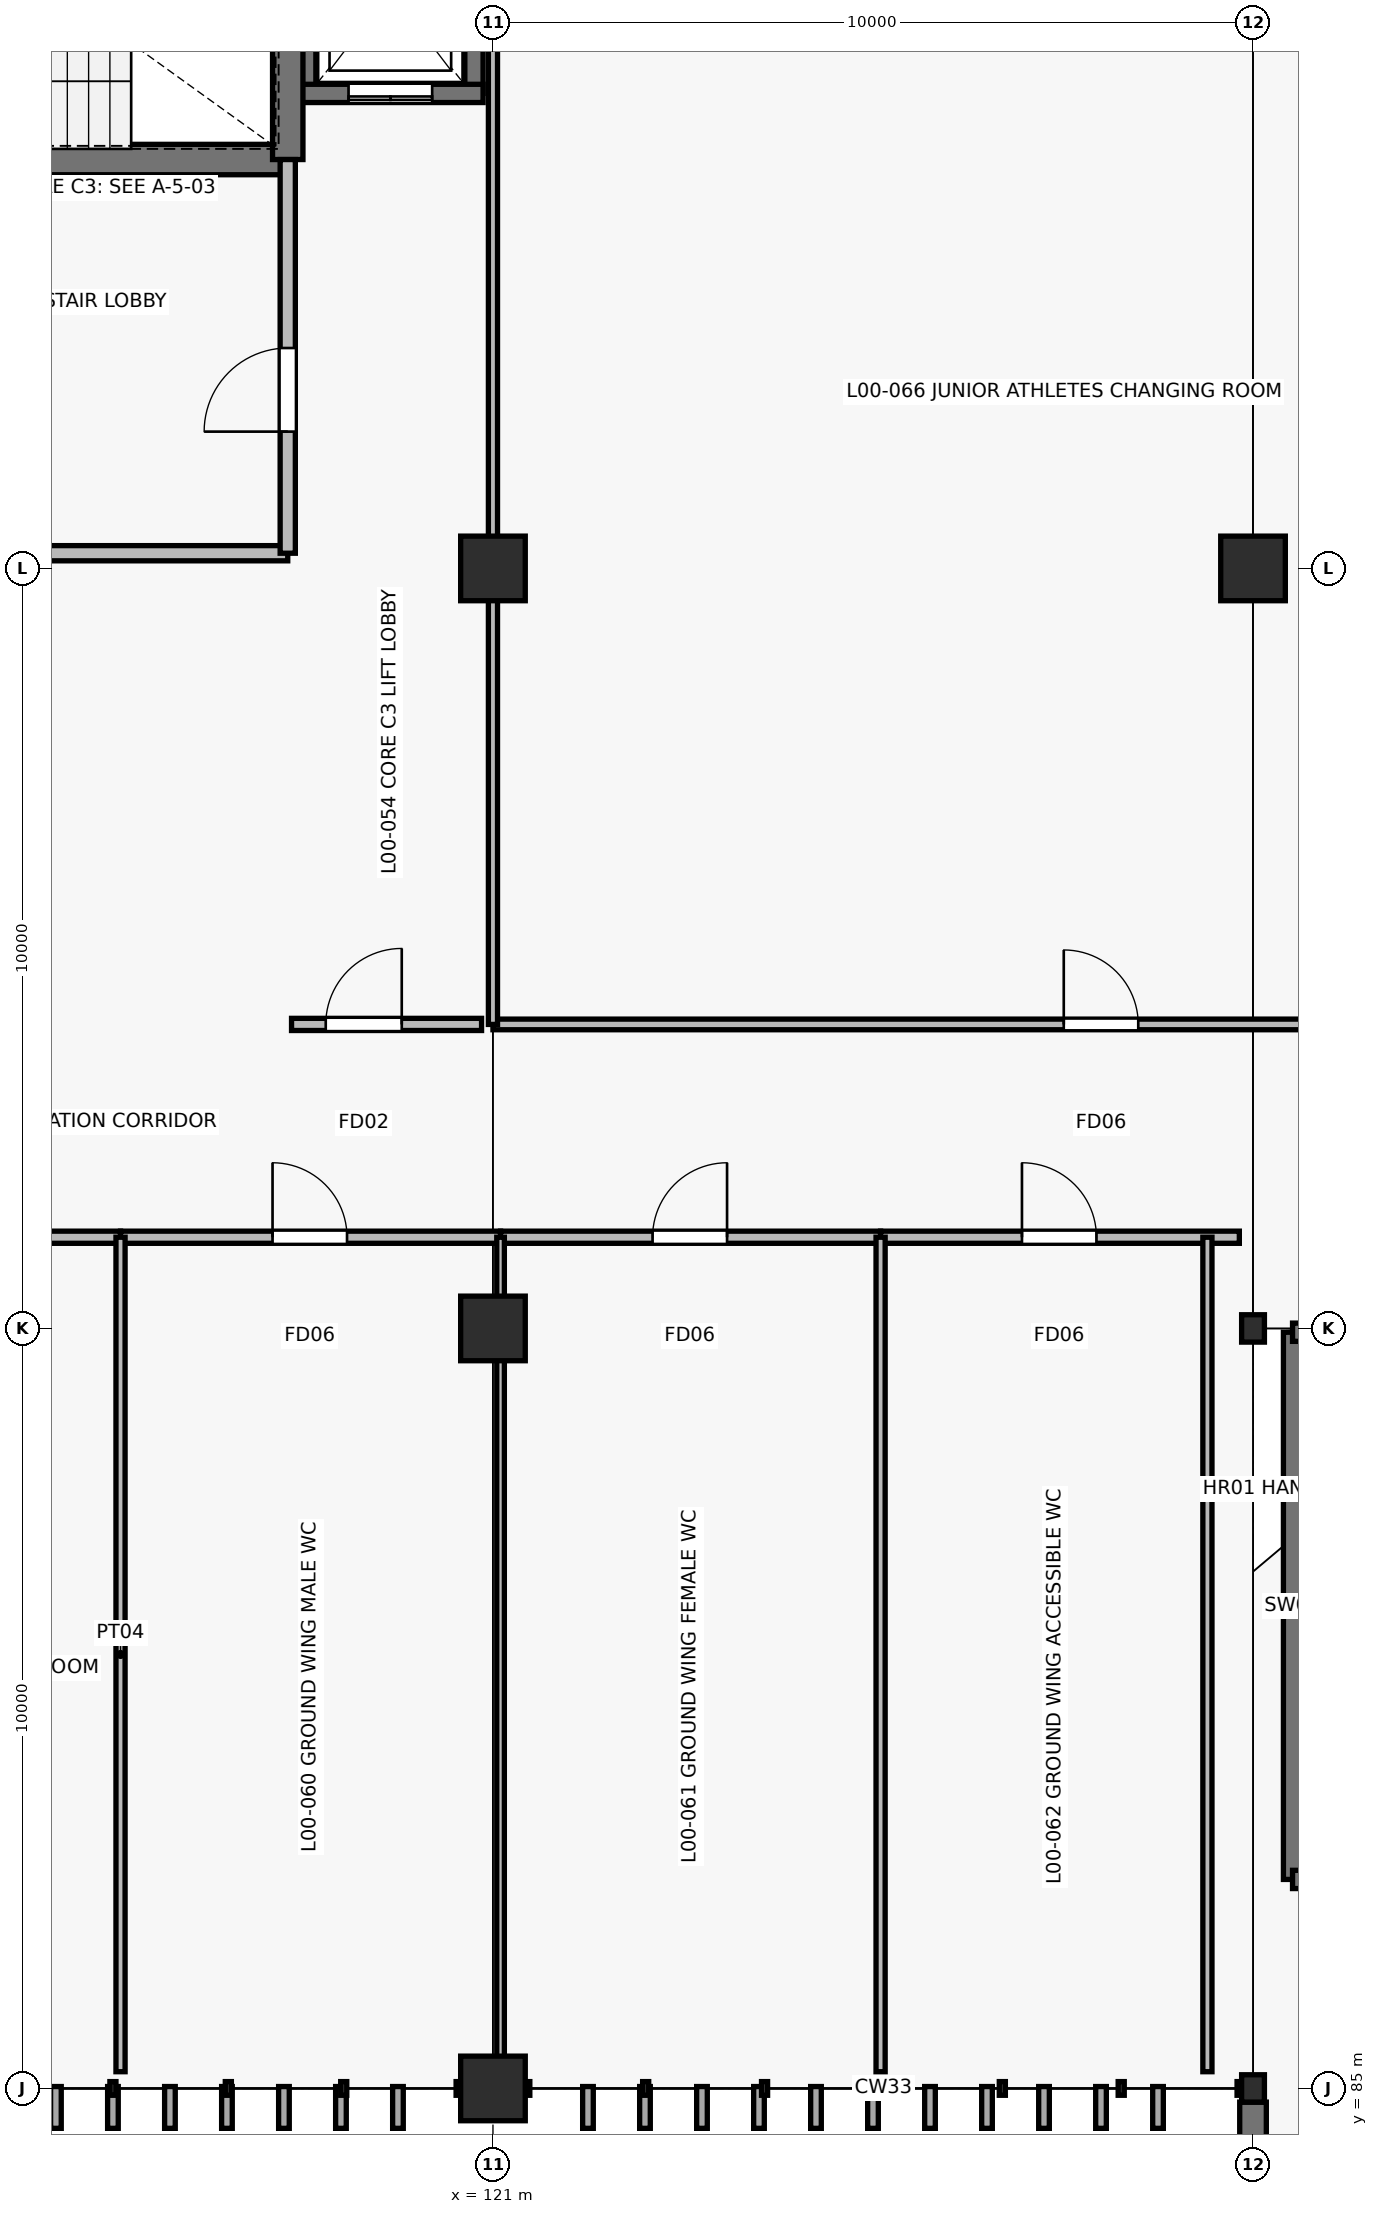
"""IFC4 building model, lengths in metres.
Left out: names, types, materials, properties, quantities, classifications, styles, units other than length and angle.
Written with IfcOpenShell. Run it as: python <this file> out.ifc"""

import sys

from ifc_helpers import new_model, si_unit, direction, frame, frame_2d, origin, origin_2d, place, context, subcontext, project, spatial, rectangle, i_section, extrude, element, fill, save


model = new_model("IFC4")
c1 = context("Model", 3, precision=1e-05, world=origin(), true_north=direction((0.0, 1.0)))
c2 = subcontext(c1, "Body", "Model", "MODEL_VIEW")
j1 = project(units=[si_unit("LENGTHUNIT", "METRE"), si_unit("PLANEANGLEUNIT", "RADIAN")], contexts=[c1])
p1 = place(None, origin())
s1 = spatial("IfcSite", under=j1, at=p1, CompositionType="ELEMENT")
p2 = place(p1, origin())
s2 = spatial("IfcBuilding", under=s1, at=p2, CompositionType="ELEMENT")
p3 = place(p2, origin())
s3 = spatial("IfcBuildingStorey", under=s2, at=p3, CompositionType="ELEMENT", Elevation=0.0)
for number, where, z_axis, x_axis in (
    (1, (131.0, 85.0, 0.0), (0.0, 0.0, 1.0), (1.0, 0.0, 0.0)),
    (2, (131.0, 95.0, 0.0), (0.0, 0.0, 1.0), (1.0, 0.0, 0.0)),
):
    element("IfcColumn", number, at=place(p3, frame(where, z_axis=z_axis, x_axis=x_axis)), inside=s3, PredefinedType="COLUMN", context=c2, shape_type="SweptSolid", body=[
        extrude(i_section(OverallWidth=0.3, OverallDepth=0.36, WebThickness=0.012, FlangeThickness=0.022, at=origin_2d()), origin(), (0.0, 0.0, 1.0), 4.8),
    ])
for number, where, z_axis, x_axis in (
    (3, (121.0, 85.0, 0.0), (0.0, 0.0, 1.0), (1.0, 0.0, 0.0)),
    (4, (121.0, 95.0, 0.0), (0.0, 0.0, 1.0), (1.0, 0.0, 0.0)),
    (5, (121.0, 105.0, 0.0), (0.0, 0.0, 1.0), (1.0, 0.0, 0.0)),
    (6, (131.0, 105.0, 0.0), (0.0, 0.0, 1.0), (1.0, 0.0, 0.0)),
):
    element("IfcColumn", number, at=place(p3, frame(where, z_axis=z_axis, x_axis=x_axis)), inside=s3, PredefinedType="COLUMN", context=c2, shape_type="SweptSolid", body=[
        extrude(rectangle(XDim=0.85, YDim=0.85, at=origin_2d()), origin(), (0.0, 0.0, 1.0), 4.8),
    ])
p4 = place(p3, frame((131.0, 73.95, 0.0), z_axis=(0.0, 0.0, 1.0), x_axis=(0.0, 1.0, 0.0)))
e7 = element("IfcWall", 7, at=p4, inside=s3, PredefinedType="SOLIDWALL", context=c2, shape_type="SweptSolid", body=[
    extrude(rectangle(XDim=10.87, YDim=0.35, at=frame_2d((5.435, 0.0))), origin(), (0.0, 0.0, 1.0), 4.8),
])
p5 = place(p4, frame((3.6, 0.0, 0.0)))
e8 = element("IfcOpeningElement", 8, at=p5, cuts=e7, PredefinedType="OPENING", context=c2, shape_type="SweptSolid", body=[
    extrude(rectangle(XDim=2.1, YDim=2.35, at=frame_2d((1.05, 1.175))), frame((0.0, 0.185, 0.0), z_axis=(0.0, -1.0, 0.0), x_axis=(1.0, 0.0, 0.0)), (0.0, 0.0, 1.0), 0.37),
])
for number, where, z_axis, x_axis in (
    (9, (118.55, 111.25, 0.0), (0.0, 0.0, 1.0), (0.0, 1.0, 0.0)),
    (10, (120.75, 113.95, 0.0), (0.0, 0.0, 1.0), (0.0, -1.0, 0.0)),
):
    element("IfcWall", number, at=place(p3, frame(where, z_axis=z_axis, x_axis=x_axis)), inside=s3, PredefinedType="SHEAR", context=c2, shape_type="SweptSolid", body=[
        extrude(rectangle(XDim=2.7, YDim=0.24, at=frame_2d((1.35, 0.0))), origin(), (0.0, 0.0, 1.0), 4.8),
    ])
p6 = place(p3, frame((120.87, 111.25, 0.0), z_axis=(0.0, 0.0, 1.0), x_axis=(-1.0, 0.0, 0.0)))
e11 = element("IfcWall", 11, at=p6, inside=s3, PredefinedType="SHEAR", context=c2, shape_type="SweptSolid", body=[
    extrude(rectangle(XDim=2.44, YDim=0.24, at=frame_2d((1.22, 0.0))), origin(), (0.0, 0.0, 1.0), 4.8),
])
p7 = place(p6, frame((0.67, 0.0, 0.0)))
e12 = element("IfcOpeningElement", 12, at=p7, cuts=e11, PredefinedType="OPENING", context=c2, shape_type="SweptSolid", body=[
    extrude(rectangle(XDim=1.1, YDim=2.15, at=frame_2d((0.55, 1.075))), frame((0.0, 0.13, 0.0), z_axis=(0.0, -1.0, 0.0), x_axis=(1.0, 0.0, 0.0)), (0.0, 0.0, 1.0), 0.26),
])
p8 = place(p3, frame((111.2, 110.38, 0.0), z_axis=(0.0, 0.0, 1.0), x_axis=(1.0, 0.0, 0.0)))
e13 = element("IfcWall", 13, at=p8, inside=s3, PredefinedType="SHEAR", context=c2, shape_type="SweptSolid", body=[
    extrude(rectangle(XDim=7.1, YDim=0.4, at=frame_2d((3.55, 0.0))), origin(), (0.0, 0.0, 1.0), 4.8),
])
p9 = place(p8, frame((0.3, 0.0, 0.0)))
e14 = element("IfcOpeningElement", 14, at=p9, cuts=e13, PredefinedType="OPENING", context=c2, shape_type="SweptSolid", body=[
    extrude(rectangle(XDim=1.0, YDim=2.15, at=frame_2d((0.5, 1.075))), frame((0.0, 0.21, 0.0), z_axis=(0.0, -1.0, 0.0), x_axis=(1.0, 0.0, 0.0)), (0.0, 0.0, 1.0), 0.42),
])
p10 = place(p3, frame((118.3, 110.38, 0.0), z_axis=(0.0, 0.0, 1.0), x_axis=(0.0, 1.0, 0.0)))
e15 = element("IfcWall", 15, at=p10, inside=s3, PredefinedType="SHEAR", context=c2, shape_type="SweptSolid", body=[
    extrude(rectangle(XDim=4.24, YDim=0.4, at=frame_2d((2.12, 0.0))), origin(), (0.0, 0.0, 1.0), 4.8),
])
p11 = place(p3, frame((111.2, 105.2, 0.0), z_axis=(0.0, 0.0, 1.0), x_axis=(1.0, 0.0, 0.0)))
e16 = element("IfcWall", 16, at=p11, inside=s3, PredefinedType="PARTITIONING", context=c2, shape_type="SweptSolid", body=[
    extrude(rectangle(XDim=7.1, YDim=0.2, at=frame_2d((3.55, 0.0))), origin(), (0.0, 0.0, 1.0), 3.525),
])
p12 = place(p11, frame((2.2, 0.0, 0.0)))
e17 = element("IfcOpeningElement", 17, at=p12, cuts=e16, PredefinedType="OPENING", context=c2, shape_type="SweptSolid", body=[
    extrude(rectangle(XDim=1.6, YDim=2.2, at=frame_2d((0.8, 1.1))), frame((0.0, 0.11, 0.0), z_axis=(0.0, -1.0, 0.0), x_axis=(1.0, 0.0, 0.0)), (0.0, 0.0, 1.0), 0.22),
])
p13 = place(p3, frame((118.3, 105.2, 0.0), z_axis=(0.0, 0.0, 1.0), x_axis=(0.0, 1.0, 0.0)))
e18 = element("IfcWall", 18, at=p13, inside=s3, PredefinedType="PARTITIONING", context=c2, shape_type="SweptSolid", body=[
    extrude(rectangle(XDim=5.18, YDim=0.2, at=frame_2d((2.59, 0.0))), origin(), (0.0, 0.0, 1.0), 3.625),
])
p14 = place(p13, frame((1.6, 0.0, 0.0)))
e19 = element("IfcOpeningElement", 19, at=p14, cuts=e18, PredefinedType="OPENING", context=c2, shape_type="SweptSolid", body=[
    extrude(rectangle(XDim=1.1, YDim=2.15, at=frame_2d((0.55, 1.075))), frame((0.0, 0.11, 0.0), z_axis=(0.0, -1.0, 0.0), x_axis=(1.0, 0.0, 0.0)), (0.0, 0.0, 1.0), 0.22),
])
p15 = place(p3, frame((118.35, 99.0, 0.0), z_axis=(0.0, 0.0, 1.0), x_axis=(1.0, 0.0, 0.0)))
e20 = element("IfcWall", 20, at=p15, inside=s3, PredefinedType="PARTITIONING", context=c2, shape_type="SweptSolid", body=[
    extrude(rectangle(XDim=2.5, YDim=0.16, at=frame_2d((1.25, 0.0))), origin(), (0.0, 0.0, 1.0), 3.525),
])
p16 = place(p15, frame((0.45, 0.0, 0.0)))
e21 = element("IfcOpeningElement", 21, at=p16, cuts=e20, PredefinedType="OPENING", context=c2, shape_type="SweptSolid", body=[
    extrude(rectangle(XDim=1.0, YDim=2.15, at=frame_2d((0.5, 1.075))), frame((0.0, 0.09, 0.0), z_axis=(0.0, -1.0, 0.0), x_axis=(1.0, 0.0, 0.0)), (0.0, 0.0, 1.0), 0.18),
])
p17 = place(p3, frame((131.52, 87.75, 0.0), z_axis=(0.0, 0.0, 1.0), x_axis=(0.0, 1.0, 0.0)))
e22 = element("IfcWall", 22, at=p17, inside=s3, PredefinedType="SHEAR", context=c2, shape_type="SweptSolid", body=[
    extrude(rectangle(XDim=7.2, YDim=0.24, at=frame_2d((3.6, 0.0))), origin(), (0.0, 0.0, 1.0), 4.8),
])
p18 = place(p3, frame((131.52, 94.95, 0.0), z_axis=(0.0, 0.0, 1.0), x_axis=(1.0, 0.0, 0.0)))
e23 = element("IfcWall", 23, at=p18, inside=s3, PredefinedType="SHEAR", context=c2, shape_type="SweptSolid", body=[
    extrude(rectangle(XDim=4.16, YDim=0.24, at=frame_2d((2.08, 0.0))), origin(), (0.0, 0.0, 1.0), 4.8),
])
p19 = place(p3, frame((131.52, 87.75, 0.0), z_axis=(0.0, 0.0, 1.0), x_axis=(1.0, 0.0, 0.0)))
e24 = element("IfcWall", 24, at=p19, inside=s3, PredefinedType="SHEAR", context=c2, shape_type="SweptSolid", body=[
    extrude(rectangle(XDim=4.16, YDim=0.24, at=frame_2d((2.08, 0.0))), origin(), (0.0, 0.0, 1.0), 4.8),
])
p20 = place(p19, frame((0.35, 0.0, 0.0)))
e25 = element("IfcOpeningElement", 25, at=p20, cuts=e24, PredefinedType="OPENING", context=c2, shape_type="SweptSolid", body=[
    extrude(rectangle(XDim=1.0, YDim=2.15, at=frame_2d((0.5, 1.075))), frame((0.0, 0.13, 0.0), z_axis=(0.0, -1.0, 0.0), x_axis=(1.0, 0.0, 0.0)), (0.0, 0.0, 1.0), 0.26),
])
p21 = place(p3, frame((101.1, 96.2, 0.0), z_axis=(0.0, 0.0, 1.0), x_axis=(1.0, 0.0, 0.0)))
e26 = element("IfcWall", 26, at=p21, inside=s3, PredefinedType="PARTITIONING", context=c2, shape_type="SweptSolid", body=[
    extrude(rectangle(XDim=15.0, YDim=0.16, at=frame_2d((7.5, 0.0))), origin(), (0.0, 0.0, 1.0), 3.525),
])
p22 = place(p21, frame((6.25, 0.0, 0.0)))
e27 = element("IfcOpeningElement", 27, at=p22, cuts=e26, PredefinedType="OPENING", context=c2, shape_type="SweptSolid", body=[
    extrude(rectangle(XDim=1.5, YDim=2.2, at=frame_2d((0.75, 1.1))), frame((0.0, 0.09, 0.0), z_axis=(0.0, -1.0, 0.0), x_axis=(1.0, 0.0, 0.0)), (0.0, 0.0, 1.0), 0.18),
])
p23 = place(p3, frame((116.1, 96.2, 0.0), z_axis=(0.0, 0.0, 1.0), x_axis=(1.0, 0.0, 0.0)))
e28 = element("IfcWall", 28, at=p23, inside=s3, PredefinedType="PARTITIONING", context=c2, shape_type="SweptSolid", body=[
    extrude(rectangle(XDim=5.0, YDim=0.16, at=frame_2d((2.5, 0.0))), origin(), (0.0, 0.0, 1.0), 3.525),
])
p24 = place(p23, frame((2.0, 0.0, 0.0)))
e29 = element("IfcOpeningElement", 29, at=p24, cuts=e28, PredefinedType="OPENING", context=c2, shape_type="SweptSolid", body=[
    extrude(rectangle(XDim=0.98, YDim=2.1, at=frame_2d((0.49, 1.05))), frame((0.0, 0.09, 0.0), z_axis=(0.0, -1.0, 0.0), x_axis=(1.0, 0.0, 0.0)), (0.0, 0.0, 1.0), 0.18),
])
p25 = place(p3, frame((116.1, 85.22, 0.0), z_axis=(0.0, 0.0, 1.0), x_axis=(0.0, 1.0, 0.0)))
e30 = element("IfcWall", 30, at=p25, inside=s3, PredefinedType="PARTITIONING", context=c2, shape_type="SweptSolid", body=[
    extrude(rectangle(XDim=10.98, YDim=0.12, at=frame_2d((5.49, 0.0))), origin(), (0.0, 0.0, 1.0), 3.625),
])
p26 = place(p3, frame((121.1, 96.2, 0.0), z_axis=(0.0, 0.0, 1.0), x_axis=(1.0, 0.0, 0.0)))
e31 = element("IfcWall", 31, at=p26, inside=s3, PredefinedType="PARTITIONING", context=c2, shape_type="SweptSolid", body=[
    extrude(rectangle(XDim=5.0, YDim=0.16, at=frame_2d((2.5, 0.0))), origin(), (0.0, 0.0, 1.0), 3.525),
])
p27 = place(p26, frame((2.0, 0.0, 0.0)))
e32 = element("IfcOpeningElement", 32, at=p27, cuts=e31, PredefinedType="OPENING", context=c2, shape_type="SweptSolid", body=[
    extrude(rectangle(XDim=0.98, YDim=2.1, at=frame_2d((0.49, 1.05))), frame((0.0, 0.09, 0.0), z_axis=(0.0, -1.0, 0.0), x_axis=(1.0, 0.0, 0.0)), (0.0, 0.0, 1.0), 0.18),
])
p28 = place(p3, frame((121.1, 85.22, 0.0), z_axis=(0.0, 0.0, 1.0), x_axis=(0.0, 1.0, 0.0)))
e33 = element("IfcWall", 33, at=p28, inside=s3, PredefinedType="PARTITIONING", context=c2, shape_type="SweptSolid", body=[
    extrude(rectangle(XDim=10.98, YDim=0.1, at=frame_2d((5.49, 0.0))), origin(), (0.0, 0.0, 1.0), 3.525),
])
p29 = place(p3, frame((126.1, 96.2, 0.0), z_axis=(0.0, 0.0, 1.0), x_axis=(1.0, 0.0, 0.0)))
e34 = element("IfcWall", 34, at=p29, inside=s3, PredefinedType="PARTITIONING", context=c2, shape_type="SweptSolid", body=[
    extrude(rectangle(XDim=4.72, YDim=0.16, at=frame_2d((2.36, 0.0))), origin(), (0.0, 0.0, 1.0), 3.525),
])
p30 = place(p29, frame((1.86, 0.0, 0.0)))
e35 = element("IfcOpeningElement", 35, at=p30, cuts=e34, PredefinedType="OPENING", context=c2, shape_type="SweptSolid", body=[
    extrude(rectangle(XDim=0.98, YDim=2.1, at=frame_2d((0.49, 1.05))), frame((0.0, 0.09, 0.0), z_axis=(0.0, -1.0, 0.0), x_axis=(1.0, 0.0, 0.0)), (0.0, 0.0, 1.0), 0.18),
])
for number, where, z_axis, x_axis in (
    (36, (126.1, 85.22, 0.0), (0.0, 0.0, 1.0), (0.0, 1.0, 0.0)),
    (37, (130.4, 85.22, 0.0), (0.0, 0.0, 1.0), (0.0, 1.0, 0.0)),
):
    element("IfcWall", number, at=place(p3, frame(where, z_axis=z_axis, x_axis=x_axis)), inside=s3, PredefinedType="PARTITIONING", context=c2, shape_type="SweptSolid", body=[
        extrude(rectangle(XDim=10.98, YDim=0.12, at=frame_2d((5.49, 0.0))), origin(), (0.0, 0.0, 1.0), 3.625),
    ])
p31 = place(p3, frame((121.0, 99.0, 0.0), z_axis=(0.0, 0.0, 1.0), x_axis=(1.0, 0.0, 0.0)))
e38 = element("IfcWall", 38, at=p31, inside=s3, PredefinedType="PARTITIONING", context=c2, shape_type="SweptSolid", body=[
    extrude(rectangle(XDim=16.0, YDim=0.14, at=frame_2d((8.0, 0.0))), origin(), (0.0, 0.0, 1.0), 3.525),
])
p32 = place(p31, frame((7.51, 0.0, 0.0)))
e39 = element("IfcOpeningElement", 39, at=p32, cuts=e38, PredefinedType="OPENING", context=c2, shape_type="SweptSolid", body=[
    extrude(rectangle(XDim=0.98, YDim=2.1, at=frame_2d((0.49, 1.05))), frame((0.0, 0.08, 0.0), z_axis=(0.0, -1.0, 0.0), x_axis=(1.0, 0.0, 0.0)), (0.0, 0.0, 1.0), 0.16),
])
p33 = place(p3, frame((121.0, 99.0, 0.0), z_axis=(0.0, 0.0, 1.0), x_axis=(0.0, 1.0, 0.0)))
e40 = element("IfcWall", 40, at=p33, inside=s3, PredefinedType="PARTITIONING", context=c2, shape_type="SweptSolid", body=[
    extrude(rectangle(XDim=15.75, YDim=0.12, at=frame_2d((7.875, 0.0))), origin(), (0.0, 0.0, 1.0), 3.525),
])
p34 = place(p7, origin())
e41 = element("IfcDoor", 41, at=p34, inside=s3, OperationType="DOUBLE_DOOR_SLIDING", PredefinedType="USERDEFINED", context=c2, shape_type="SweptSolid", body=[
    extrude(rectangle(XDim=1.1, YDim=2.15, at=frame_2d((0.55, 1.075))), frame((0.0, 0.025, 0.0), z_axis=(0.0, -1.0, 0.0), x_axis=(1.0, 0.0, 0.0)), (0.0, 0.0, 1.0), 0.05),
])
fill(e12, e41)
p35 = place(p14, origin())
e42 = element("IfcDoor", 42, at=p35, inside=s3, OperationType="SINGLE_SWING_LEFT", PredefinedType="DOOR", context=c2, shape_type="SweptSolid", body=[
    extrude(rectangle(XDim=1.1, YDim=2.15, at=frame_2d((0.55, 1.075))), frame((0.0, 0.025, 0.0), z_axis=(0.0, -1.0, 0.0), x_axis=(1.0, 0.0, 0.0)), (0.0, 0.0, 1.0), 0.05),
])
fill(e19, e42)
p36 = place(p16, origin())
e43 = element("IfcDoor", 43, at=p36, inside=s3, OperationType="SINGLE_SWING_RIGHT", PredefinedType="DOOR", context=c2, shape_type="SweptSolid", body=[
    extrude(rectangle(XDim=1.0, YDim=2.15, at=frame_2d((0.5, 1.075))), frame((0.0, 0.025, 0.0), z_axis=(0.0, -1.0, 0.0), x_axis=(1.0, 0.0, 0.0)), (0.0, 0.0, 1.0), 0.05),
])
fill(e21, e43)
p37 = place(p24, origin())
e44 = element("IfcDoor", 44, at=p37, inside=s3, OperationType="SINGLE_SWING_LEFT", PredefinedType="DOOR", context=c2, shape_type="SweptSolid", body=[
    extrude(rectangle(XDim=0.98, YDim=2.1, at=frame_2d((0.49, 1.05))), frame((0.0, 0.025, 0.0), z_axis=(0.0, -1.0, 0.0), x_axis=(1.0, 0.0, 0.0)), (0.0, 0.0, 1.0), 0.05),
])
fill(e29, e44)
p38 = place(p27, origin())
e45 = element("IfcDoor", 45, at=p38, inside=s3, OperationType="SINGLE_SWING_RIGHT", PredefinedType="DOOR", context=c2, shape_type="SweptSolid", body=[
    extrude(rectangle(XDim=0.98, YDim=2.1, at=frame_2d((0.49, 1.05))), frame((0.0, 0.025, 0.0), z_axis=(0.0, -1.0, 0.0), x_axis=(1.0, 0.0, 0.0)), (0.0, 0.0, 1.0), 0.05),
])
fill(e32, e45)
p39 = place(p30, origin())
e46 = element("IfcDoor", 46, at=p39, inside=s3, OperationType="SINGLE_SWING_LEFT", PredefinedType="DOOR", context=c2, shape_type="SweptSolid", body=[
    extrude(rectangle(XDim=0.98, YDim=2.1, at=frame_2d((0.49, 1.05))), frame((0.0, 0.025, 0.0), z_axis=(0.0, -1.0, 0.0), x_axis=(1.0, 0.0, 0.0)), (0.0, 0.0, 1.0), 0.05),
])
fill(e35, e46)
p40 = place(p32, origin())
e47 = element("IfcDoor", 47, at=p40, inside=s3, OperationType="SINGLE_SWING_LEFT", PredefinedType="DOOR", context=c2, shape_type="SweptSolid", body=[
    extrude(rectangle(XDim=0.98, YDim=2.1, at=frame_2d((0.49, 1.05))), frame((0.0, 0.025, 0.0), z_axis=(0.0, -1.0, 0.0), x_axis=(1.0, 0.0, 0.0)), (0.0, 0.0, 1.0), 0.05),
])
fill(e39, e47)
save(model, sys.argv[1])
